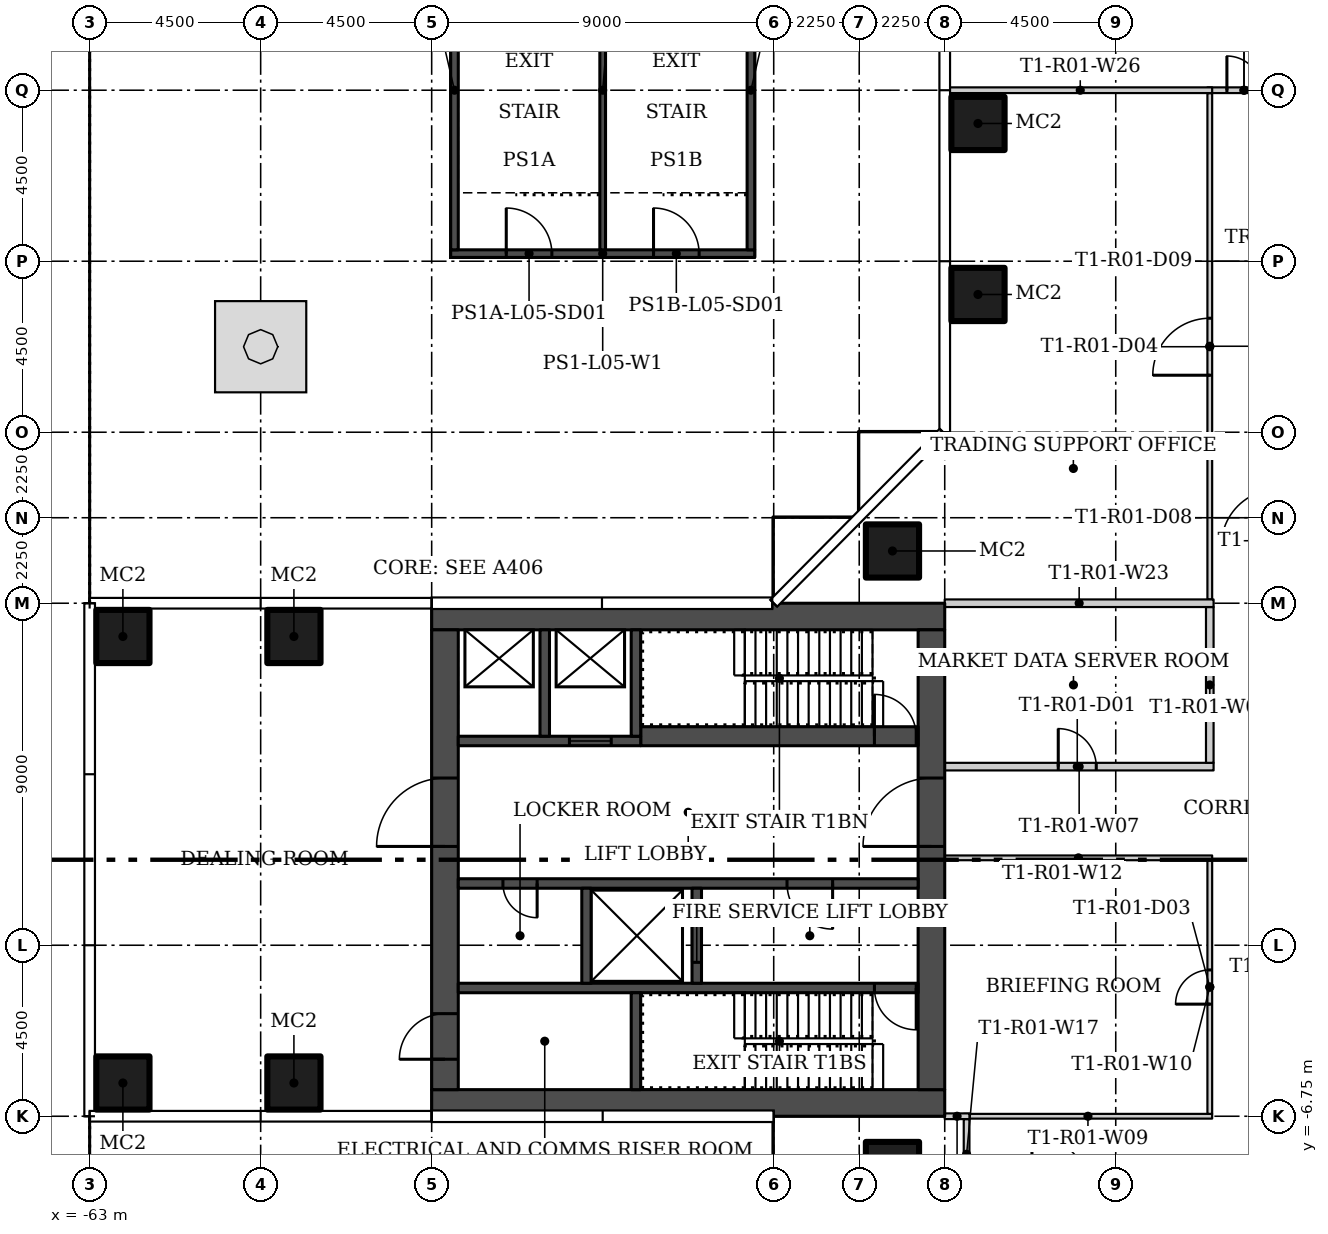
"""IFC4 building model, lengths in metres.
Left out: names, types, materials, properties, quantities, classifications, styles, units other than length and angle.
Written with IfcOpenShell. Run it as: python <this file> out.ifc"""

import sys

from ifc_helpers import new_model, si_unit, direction, frame, frame_2d, origin, origin_2d, place, context, subcontext, project, spatial, rectangle, hollow_rectangle, extrude, element, fill, save


model = new_model("IFC4")
c1 = context("Model", 3, precision=1e-05, world=origin(), true_north=direction((0.0, 1.0)))
c2 = subcontext(c1, "Body", "Model", "MODEL_VIEW")
j1 = project(units=[si_unit("LENGTHUNIT", "METRE"), si_unit("PLANEANGLEUNIT", "RADIAN")], contexts=[c1])
p1 = place(None, origin())
s1 = spatial("IfcSite", under=j1, at=p1, CompositionType="ELEMENT")
p2 = place(p1, origin())
s2 = spatial("IfcBuilding", under=s1, at=p2, CompositionType="ELEMENT")
p3 = place(p2, frame((0.0, 0.0, 28.5)))
s3 = spatial("IfcBuildingStorey", under=s2, at=p3, CompositionType="ELEMENT", Elevation=28.5)
for number, where in (
    (1, (-41.875, 8.125, 0.0)),
    (2, (-41.875, -8.125, 0.0)),
    (3, (-57.625, -5.875, 0.0)),
    (4, (-62.125, -5.875, 0.0)),
    (5, (-57.625, 5.875, 0.0)),
    (6, (-62.125, 5.875, 0.0)),
    (7, (-39.625, 14.875, 0.0)),
    (8, (-39.625, 19.375, 0.0)),
):
    element("IfcColumn", number, at=place(p3, frame(where)), inside=s3, PredefinedType="COLUMN", context=c2, shape_type="SweptSolid", body=[
        extrude(hollow_rectangle(XDim=1.4, YDim=1.4, WallThickness=0.05, at=origin_2d()), origin(), (0.0, 0.0, 1.0), 4.15),
    ])
p4 = place(p3, frame((-40.5, 2.45, 0.0)))
e9 = element("IfcWall", 9, at=p4, inside=s3, PredefinedType="PARTITIONING", context=c2, shape_type="SweptSolid", body=[
    extrude(rectangle(XDim=7.075, YDim=0.2, at=frame_2d((3.537, 0.0))), origin(), (0.0, 0.0, 1.0), 4.15),
])
p5 = place(p4, frame((2.987, 0.0, 0.0)))
e10 = element("IfcOpeningElement", 10, at=p5, cuts=e9, PredefinedType="OPENING", context=c2, shape_type="SweptSolid", body=[
    extrude(rectangle(XDim=1.0, YDim=2.1, at=frame_2d((0.5, 1.05))), frame((0.0, 0.11, 0.0), z_axis=(0.0, -1.0, 0.0), x_axis=(1.0, 0.0, 0.0)), (0.0, 0.0, 1.0), 0.22),
])
p6 = place(p3, frame((-33.525, 2.55, 0.0), z_axis=(0.0, 0.0, 1.0), x_axis=(0.0, 1.0, 0.0)))
e11 = element("IfcWall", 11, at=p6, inside=s3, PredefinedType="PARTITIONING", context=c2, shape_type="SweptSolid", body=[
    extrude(rectangle(XDim=4.1, YDim=0.2, at=frame_2d((2.05, 0.0))), origin(), (0.0, 0.0, 1.0), 4.15),
])
p7 = place(p3, frame((-40.0, -6.75, 0.0)))
e12 = element("IfcWall", 12, at=p7, inside=s3, PredefinedType="PARTITIONING", context=c2, shape_type="SweptSolid", body=[
    extrude(rectangle(XDim=6.537, YDim=0.125, at=frame_2d((3.269, 0.0))), origin(), (0.0, 0.0, 1.0), 4.15),
])
p8 = place(p3, frame((-33.525, -6.688, 0.0), z_axis=(0.0, 0.0, 1.0), x_axis=(0.0, 1.0, 0.0)))
e13 = element("IfcWall", 13, at=p8, inside=s3, PredefinedType="PARTITIONING", context=c2, shape_type="SweptSolid", body=[
    extrude(rectangle(XDim=6.675, YDim=0.125, at=frame_2d((3.337, 0.0))), origin(), (0.0, 0.0, 1.0), 4.15),
])
p9 = place(p8, frame((2.887, 0.0, 0.0)))
e14 = element("IfcOpeningElement", 14, at=p9, cuts=e13, PredefinedType="OPENING", context=c2, shape_type="SweptSolid", body=[
    extrude(rectangle(XDim=0.9, YDim=2.1, at=frame_2d((0.45, 1.05))), frame((0.0, 0.073, 0.0), z_axis=(0.0, -1.0, 0.0), x_axis=(1.0, 0.0, 0.0)), (0.0, 0.0, 1.0), 0.145),
])
p10 = place(p3, frame((-33.525, 6.85, 0.0), z_axis=(0.0, 0.0, 1.0), x_axis=(0.0, 1.0, 0.0)))
e15 = element("IfcWall", 15, at=p10, inside=s3, PredefinedType="PARTITIONING", context=c2, shape_type="SweptSolid", body=[
    extrude(rectangle(XDim=13.325, YDim=0.125, at=frame_2d((6.663, 0.0))), origin(), (0.0, 0.0, 1.0), 4.15),
])
p11 = place(p10, frame((5.9, 0.0, 0.0)))
e16 = element("IfcOpeningElement", 16, at=p11, cuts=e15, PredefinedType="OPENING", context=c2, shape_type="SweptSolid", body=[
    extrude(rectangle(XDim=1.5, YDim=2.1, at=frame_2d((0.75, 1.05))), frame((0.0, 0.073, 0.0), z_axis=(0.0, -1.0, 0.0), x_axis=(1.0, 0.0, 0.0)), (0.0, 0.0, 1.0), 0.145),
])
p12 = place(p3, frame((-33.463, 0.05, 0.0), z_axis=(0.0, 0.0, 1.0), x_axis=(-1.0, 0.0, 0.0)))
e17 = element("IfcWall", 17, at=p12, inside=s3, PredefinedType="PARTITIONING", context=c2, shape_type="SweptSolid", body=[
    extrude(rectangle(XDim=7.037, YDim=0.125, at=frame_2d((3.519, 0.0))), origin(), (0.0, 0.0, 1.0), 4.15),
])
p13 = place(p3, frame((-33.588, 20.25, 0.0)))
e18 = element("IfcWall", 18, at=p13, inside=s3, PredefinedType="PARTITIONING", context=c2, shape_type="SweptSolid", body=[
    extrude(rectangle(XDim=1.926, YDim=0.15, at=frame_2d((0.963, 0.0))), origin(), (0.0, 0.0, 1.0), 4.15),
])
p14 = place(p13, frame((0.513, 0.0, 0.0)))
e19 = element("IfcOpeningElement", 19, at=p14, cuts=e18, PredefinedType="OPENING", context=c2, shape_type="SweptSolid", body=[
    extrude(rectangle(XDim=0.9, YDim=2.1, at=frame_2d((0.45, 1.05))), frame((0.0, 0.085, 0.0), z_axis=(0.0, -1.0, 0.0), x_axis=(1.0, 0.0, 0.0)), (0.0, 0.0, 1.0), 0.17),
])
p15 = place(p3, frame((-39.925, -6.825, 0.0), z_axis=(0.0, 0.0, 1.0), x_axis=(0.0, -1.0, 0.0)))
e20 = element("IfcWall", 20, at=p15, inside=s3, PredefinedType="PARTITIONING", context=c2, shape_type="SweptSolid", body=[
    extrude(rectangle(XDim=1.85, YDim=0.15, at=frame_2d((0.925, 0.0))), origin(), (0.0, 0.0, 1.0), 4.15),
])
p16 = place(p3, frame((-40.5, -6.75, 0.0)))
e21 = element("IfcWall", 21, at=p16, inside=s3, PredefinedType="PARTITIONING", context=c2, shape_type="SweptSolid", body=[
    extrude(rectangle(XDim=0.65, YDim=0.15, at=frame_2d((0.325, 0.0))), origin(), (0.0, 0.0, 1.0), 4.15),
])
p17 = place(p3, frame((-33.425, 6.75, 0.0), z_axis=(0.0, 0.0, 1.0), x_axis=(-1.0, 0.0, 0.0)))
e22 = element("IfcWall", 22, at=p17, inside=s3, PredefinedType="PARTITIONING", context=c2, shape_type="SweptSolid", body=[
    extrude(rectangle(XDim=7.075, YDim=0.2, at=frame_2d((3.537, 0.0))), origin(), (0.0, 0.0, 1.0), 4.15),
])
p18 = place(p3, frame((-33.463, 20.25, 0.0), z_axis=(0.0, 0.0, 1.0), x_axis=(-1.0, 0.0, 0.0)))
e23 = element("IfcWall", 23, at=p18, inside=s3, PredefinedType="PARTITIONING", context=c2, shape_type="SweptSolid", body=[
    extrude(rectangle(XDim=6.942, YDim=0.15, at=frame_2d((3.471, 0.0))), origin(), (0.0, 0.0, 1.0), 4.15),
])
for number, where, z_axis, x_axis in (
    (24, (-40.5, -6.4, 0.0), (0.0, 0.0, 1.0), (-1.0, 0.0, 0.0)),
    (25, (-40.5, 6.4, 0.0), (0.0, 0.0, 1.0), (-1.0, 0.0, 0.0)),
):
    element("IfcWall", number, at=place(p3, frame(where, z_axis=z_axis, x_axis=x_axis)), inside=s3, PredefinedType="SHEAR", context=c2, shape_type="SweptSolid", body=[
        extrude(rectangle(XDim=13.5, YDim=0.7, at=frame_2d((6.75, 0.0))), origin(), (0.0, 0.0, 1.0), 4.15),
    ])
p19 = place(p3, frame((-40.85, -6.05, 0.0), z_axis=(0.0, 0.0, 1.0), x_axis=(0.0, 1.0, 0.0)))
e26 = element("IfcWall", 26, at=p19, inside=s3, PredefinedType="SHEAR", context=c2, shape_type="SweptSolid", body=[
    extrude(rectangle(XDim=12.1, YDim=0.7, at=frame_2d((6.05, 0.0))), origin(), (0.0, 0.0, 1.0), 4.15),
])
p20 = place(p19, frame((6.4, 0.0, 0.0)))
e27 = element("IfcOpeningElement", 27, at=p20, cuts=e26, PredefinedType="OPENING", context=c2, shape_type="SweptSolid", body=[
    extrude(rectangle(XDim=1.8, YDim=2.4, at=frame_2d((0.9, 1.2))), frame((0.0, 0.36, 0.0), z_axis=(0.0, -1.0, 0.0), x_axis=(1.0, 0.0, 0.0)), (0.0, 0.0, 1.0), 0.72),
])
p21 = place(p3, frame((-53.65, -6.05, 0.0), z_axis=(0.0, 0.0, 1.0), x_axis=(0.0, 1.0, 0.0)))
e28 = element("IfcWall", 28, at=p21, inside=s3, PredefinedType="SHEAR", context=c2, shape_type="SweptSolid", body=[
    extrude(rectangle(XDim=12.1, YDim=0.7, at=frame_2d((6.05, 0.0))), origin(), (0.0, 0.0, 1.0), 4.15),
])
p22 = place(p21, frame((0.8, 0.0, 0.0)))
e29 = element("IfcOpeningElement", 29, at=p22, cuts=e28, PredefinedType="OPENING", context=c2, shape_type="SweptSolid", body=[
    extrude(rectangle(XDim=1.2, YDim=2.1, at=frame_2d((0.6, 1.05))), frame((0.0, 0.36, 0.0), z_axis=(0.0, -1.0, 0.0), x_axis=(1.0, 0.0, 0.0)), (0.0, 0.0, 1.0), 0.72),
])
p23 = place(p21, frame((6.4, 0.0, 0.0)))
e30 = element("IfcOpeningElement", 30, at=p23, cuts=e28, PredefinedType="OPENING", context=c2, shape_type="SweptSolid", body=[
    extrude(rectangle(XDim=1.8, YDim=2.4, at=frame_2d((0.9, 1.2))), frame((0.0, 0.36, 0.0), z_axis=(0.0, -1.0, 0.0), x_axis=(1.0, 0.0, 0.0)), (0.0, 0.0, 1.0), 0.72),
])
p24 = place(p3, frame((-41.2, -3.375, 0.0), z_axis=(0.0, 0.0, 1.0), x_axis=(-1.0, 0.0, 0.0)))
e31 = element("IfcWall", 31, at=p24, inside=s3, PredefinedType="SHEAR", context=c2, shape_type="SweptSolid", body=[
    extrude(rectangle(XDim=12.1, YDim=0.25, at=frame_2d((6.05, 0.0))), origin(), (0.0, 0.0, 1.0), 4.15),
])
p25 = place(p24, frame((0.05, 0.0, 0.0)))
e32 = element("IfcOpeningElement", 32, at=p25, cuts=e31, PredefinedType="OPENING", context=c2, shape_type="SweptSolid", body=[
    extrude(rectangle(XDim=1.1, YDim=2.1, at=frame_2d((0.55, 1.05))), frame((0.0, 0.135, 0.0), z_axis=(0.0, -1.0, 0.0), x_axis=(1.0, 0.0, 0.0)), (0.0, 0.0, 1.0), 0.27),
])
p26 = place(p3, frame((-48.625, -6.05, 0.0), z_axis=(0.0, 0.0, 1.0), x_axis=(0.0, 1.0, 0.0)))
e33 = element("IfcWall", 33, at=p26, inside=s3, PredefinedType="SHEAR", context=c2, shape_type="SweptSolid", body=[
    extrude(rectangle(XDim=2.55, YDim=0.25, at=frame_2d((1.275, 0.0))), origin(), (0.0, 0.0, 1.0), 4.15),
])
p27 = place(p3, frame((-41.2, -0.625, 0.0), z_axis=(0.0, 0.0, 1.0), x_axis=(-1.0, 0.0, 0.0)))
e34 = element("IfcWall", 34, at=p27, inside=s3, PredefinedType="SHEAR", context=c2, shape_type="SweptSolid", body=[
    extrude(rectangle(XDim=12.1, YDim=0.25, at=frame_2d((6.05, 0.0))), origin(), (0.0, 0.0, 1.0), 4.15),
])
p28 = place(p27, frame((2.25, 0.0, 0.0)))
e35 = element("IfcOpeningElement", 35, at=p28, cuts=e34, PredefinedType="OPENING", context=c2, shape_type="SweptSolid", body=[
    extrude(rectangle(XDim=1.2, YDim=2.1, at=frame_2d((0.6, 1.05))), frame((0.0, 0.135, 0.0), z_axis=(0.0, -1.0, 0.0), x_axis=(1.0, 0.0, 0.0)), (0.0, 0.0, 1.0), 0.27),
])
p29 = place(p27, frame((10.025, 0.0, 0.0)))
e36 = element("IfcOpeningElement", 36, at=p29, cuts=e34, PredefinedType="OPENING", context=c2, shape_type="SweptSolid", body=[
    extrude(rectangle(XDim=0.9, YDim=2.1, at=frame_2d((0.45, 1.05))), frame((0.0, 0.135, 0.0), z_axis=(0.0, -1.0, 0.0), x_axis=(1.0, 0.0, 0.0)), (0.0, 0.0, 1.0), 0.27),
])
p30 = place(p3, frame((-47.025, -3.25, 0.0), z_axis=(0.0, 0.0, 1.0), x_axis=(0.0, 1.0, 0.0)))
e37 = element("IfcWall", 37, at=p30, inside=s3, PredefinedType="SHEAR", context=c2, shape_type="SweptSolid", body=[
    extrude(rectangle(XDim=2.5, YDim=0.25, at=frame_2d((1.25, 0.0))), origin(), (0.0, 0.0, 1.0), 4.15),
])
p31 = place(p30, frame((0.55, 0.0, 0.0)))
e38 = element("IfcOpeningElement", 38, at=p31, cuts=e37, PredefinedType="OPENING", context=c2, shape_type="SweptSolid", body=[
    extrude(rectangle(XDim=1.4, YDim=2.4, at=frame_2d((0.7, 1.2))), frame((0.0, 0.135, 0.0), z_axis=(0.0, -1.0, 0.0), x_axis=(1.0, 0.0, 0.0)), (0.0, 0.0, 1.0), 0.27),
])
p32 = place(p3, frame((-49.925, -3.25, 0.0), z_axis=(0.0, 0.0, 1.0), x_axis=(0.0, 1.0, 0.0)))
e39 = element("IfcWall", 39, at=p32, inside=s3, PredefinedType="SHEAR", context=c2, shape_type="SweptSolid", body=[
    extrude(rectangle(XDim=2.5, YDim=0.25, at=frame_2d((1.25, 0.0))), origin(), (0.0, 0.0, 1.0), 4.15),
])
p33 = place(p3, frame((-48.5, 3.25, 0.0)))
e40 = element("IfcWall", 40, at=p33, inside=s3, PredefinedType="SHEAR", context=c2, shape_type="SweptSolid", body=[
    extrude(rectangle(XDim=7.3, YDim=0.5, at=frame_2d((3.65, 0.0))), origin(), (0.0, 0.0, 1.0), 4.15),
])
p34 = place(p33, frame((6.15, 0.0, 0.0)))
e41 = element("IfcOpeningElement", 41, at=p34, cuts=e40, PredefinedType="OPENING", context=c2, shape_type="SweptSolid", body=[
    extrude(rectangle(XDim=1.1, YDim=2.1, at=frame_2d((0.55, 1.05))), frame((0.0, 0.26, 0.0), z_axis=(0.0, -1.0, 0.0), x_axis=(1.0, 0.0, 0.0)), (0.0, 0.0, 1.0), 0.52),
])
p35 = place(p3, frame((-48.5, 3.125, 0.0), z_axis=(0.0, 0.0, 1.0), x_axis=(-1.0, 0.0, 0.0)))
e42 = element("IfcWall", 42, at=p35, inside=s3, PredefinedType="SHEAR", context=c2, shape_type="SweptSolid", body=[
    extrude(rectangle(XDim=4.8, YDim=0.25, at=frame_2d((2.4, 0.0))), origin(), (0.0, 0.0, 1.0), 4.15),
])
p36 = place(p35, frame((0.775, 0.0, 0.0)))
e43 = element("IfcOpeningElement", 43, at=p36, cuts=e42, PredefinedType="OPENING", context=c2, shape_type="SweptSolid", body=[
    extrude(rectangle(XDim=1.1, YDim=2.1, at=frame_2d((0.55, 1.05))), frame((0.0, 0.135, 0.0), z_axis=(0.0, -1.0, 0.0), x_axis=(1.0, 0.0, 0.0)), (0.0, 0.0, 1.0), 0.27),
])
for number, where, z_axis, x_axis in (
    (44, (-48.625, 3.25, 0.0), (0.0, 0.0, 1.0), (0.0, 1.0, 0.0)),
    (45, (-51.025, 3.25, 0.0), (0.0, 0.0, 1.0), (0.0, 1.0, 0.0)),
):
    element("IfcWall", number, at=place(p3, frame(where, z_axis=z_axis, x_axis=x_axis)), inside=s3, PredefinedType="SHEAR", context=c2, shape_type="SweptSolid", body=[
        extrude(rectangle(XDim=2.8, YDim=0.25, at=frame_2d((1.4, 0.0))), origin(), (0.0, 0.0, 1.0), 4.15),
    ])
p37 = place(p3, frame((-53.5, 15.95, 0.0)))
e46 = element("IfcWall", 46, at=p37, inside=s3, PredefinedType="SHEAR", context=c2, shape_type="SweptSolid", body=[
    extrude(rectangle(XDim=8.0, YDim=0.2, at=frame_2d((4.0, 0.0))), origin(), (0.0, 0.0, 1.0), 2.8),
])
p38 = place(p37, frame((1.462, 0.0, 0.0)))
e47 = element("IfcOpeningElement", 47, at=p38, cuts=e46, PredefinedType="OPENING", context=c2, shape_type="SweptSolid", body=[
    extrude(rectangle(XDim=1.2, YDim=2.4, at=frame_2d((0.6, 1.2))), frame((0.0, 0.11, 0.0), z_axis=(0.0, -1.0, 0.0), x_axis=(1.0, 0.0, 0.0)), (0.0, 0.0, 1.0), 0.22),
])
p39 = place(p37, frame((5.337, 0.0, 0.0)))
e48 = element("IfcOpeningElement", 48, at=p39, cuts=e46, PredefinedType="OPENING", context=c2, shape_type="SweptSolid", body=[
    extrude(rectangle(XDim=1.2, YDim=2.4, at=frame_2d((0.6, 1.2))), frame((0.0, 0.11, 0.0), z_axis=(0.0, -1.0, 0.0), x_axis=(1.0, 0.0, 0.0)), (0.0, 0.0, 1.0), 0.22),
])
for number, where, z_axis, x_axis in (
    (49, (-53.4, 16.05, 0.0), (0.0, 0.0, 1.0), (0.0, 1.0, 0.0)),
    (50, (-45.6, 16.05, 0.0), (0.0, 0.0, 1.0), (0.0, 1.0, 0.0)),
):
    element("IfcWall", number, at=place(p3, frame(where, z_axis=z_axis, x_axis=x_axis)), inside=s3, PredefinedType="SHEAR", context=c2, shape_type="SweptSolid", body=[
        extrude(rectangle(XDim=8.4, YDim=0.2, at=frame_2d((4.2, 0.0))), origin(), (0.0, 0.0, 1.0), 2.8),
    ])
p40 = place(p3, frame((-49.5, 16.05, 0.0), z_axis=(0.0, 0.0, 1.0), x_axis=(0.0, 1.0, 0.0)))
e51 = element("IfcWall", 51, at=p40, inside=s3, PredefinedType="SHEAR", context=c2, shape_type="SweptSolid", body=[
    extrude(rectangle(XDim=8.4, YDim=0.15, at=frame_2d((4.2, 0.0))), origin(), (0.0, 0.0, 1.0), 2.8),
])
p41 = place(p5, origin())
e52 = element("IfcDoor", 52, at=p41, inside=s3, OperationType="SINGLE_SWING_LEFT", PredefinedType="DOOR", context=c2, shape_type="SweptSolid", body=[
    extrude(rectangle(XDim=1.0, YDim=2.1, at=frame_2d((0.5, 1.05))), frame((0.0, 0.025, 0.0), z_axis=(0.0, -1.0, 0.0), x_axis=(1.0, 0.0, 0.0)), (0.0, 0.0, 1.0), 0.05),
])
fill(e10, e52)
p42 = place(p9, origin())
e53 = element("IfcDoor", 53, at=p42, inside=s3, OperationType="SINGLE_SWING_RIGHT", PredefinedType="DOOR", context=c2, shape_type="SweptSolid", body=[
    extrude(rectangle(XDim=0.9, YDim=2.1, at=frame_2d((0.45, 1.05))), frame((0.0, 0.025, 0.0), z_axis=(0.0, -1.0, 0.0), x_axis=(1.0, 0.0, 0.0)), (0.0, 0.0, 1.0), 0.05),
])
fill(e14, e53)
p43 = place(p11, origin())
e54 = element("IfcDoor", 54, at=p43, inside=s3, OperationType="DOUBLE_DOOR_SINGLE_SWING", PredefinedType="DOOR", context=c2, shape_type="SweptSolid", body=[
    extrude(rectangle(XDim=1.5, YDim=2.1, at=frame_2d((0.75, 1.05))), frame((0.0, 0.025, 0.0), z_axis=(0.0, -1.0, 0.0), x_axis=(1.0, 0.0, 0.0)), (0.0, 0.0, 1.0), 0.05),
])
fill(e16, e54)
p44 = place(p14, origin())
e55 = element("IfcDoor", 55, at=p44, inside=s3, OperationType="SINGLE_SWING_LEFT", PredefinedType="DOOR", context=c2, shape_type="SweptSolid", body=[
    extrude(rectangle(XDim=0.9, YDim=2.1, at=frame_2d((0.45, 1.05))), frame((0.0, 0.025, 0.0), z_axis=(0.0, -1.0, 0.0), x_axis=(1.0, 0.0, 0.0)), (0.0, 0.0, 1.0), 0.05),
])
fill(e19, e55)
p45 = place(p20, origin())
e56 = element("IfcDoor", 56, at=p45, inside=s3, OperationType="DOUBLE_DOOR_SINGLE_SWING", PredefinedType="DOOR", context=c2, shape_type="SweptSolid", body=[
    extrude(rectangle(XDim=1.8, YDim=2.4, at=frame_2d((0.9, 1.2))), frame((0.0, 0.025, 0.0), z_axis=(0.0, -1.0, 0.0), x_axis=(1.0, 0.0, 0.0)), (0.0, 0.0, 1.0), 0.05),
])
fill(e27, e56)
p46 = place(p22, origin())
e57 = element("IfcDoor", 57, at=p46, inside=s3, OperationType="SINGLE_SWING_LEFT", PredefinedType="DOOR", context=c2, shape_type="SweptSolid", body=[
    extrude(rectangle(XDim=1.2, YDim=2.1, at=frame_2d((0.6, 1.05))), frame((0.0, 0.025, 0.0), z_axis=(0.0, -1.0, 0.0), x_axis=(1.0, 0.0, 0.0)), (0.0, 0.0, 1.0), 0.05),
])
fill(e29, e57)
p47 = place(p23, origin())
e58 = element("IfcDoor", 58, at=p47, inside=s3, OperationType="DOUBLE_DOOR_SINGLE_SWING", PredefinedType="DOOR", context=c2, shape_type="SweptSolid", body=[
    extrude(rectangle(XDim=1.8, YDim=2.4, at=frame_2d((0.9, 1.2))), frame((0.0, 0.025, 0.0), z_axis=(0.0, -1.0, 0.0), x_axis=(1.0, 0.0, 0.0)), (0.0, 0.0, 1.0), 0.05),
])
fill(e30, e58)
p48 = place(p25, origin())
e59 = element("IfcDoor", 59, at=p48, inside=s3, OperationType="SINGLE_SWING_LEFT", PredefinedType="DOOR", context=c2, shape_type="SweptSolid", body=[
    extrude(rectangle(XDim=1.1, YDim=2.1, at=frame_2d((0.55, 1.05))), frame((0.0, 0.025, 0.0), z_axis=(0.0, -1.0, 0.0), x_axis=(1.0, 0.0, 0.0)), (0.0, 0.0, 1.0), 0.05),
])
fill(e32, e59)
p49 = place(p28, origin())
e60 = element("IfcDoor", 60, at=p49, inside=s3, OperationType="SINGLE_SWING_LEFT", PredefinedType="DOOR", context=c2, shape_type="SweptSolid", body=[
    extrude(rectangle(XDim=1.2, YDim=2.1, at=frame_2d((0.6, 1.05))), frame((0.0, 0.025, 0.0), z_axis=(0.0, -1.0, 0.0), x_axis=(1.0, 0.0, 0.0)), (0.0, 0.0, 1.0), 0.05),
])
fill(e35, e60)
p50 = place(p29, origin())
e61 = element("IfcDoor", 61, at=p50, inside=s3, OperationType="SINGLE_SWING_RIGHT", PredefinedType="DOOR", context=c2, shape_type="SweptSolid", body=[
    extrude(rectangle(XDim=0.9, YDim=2.1, at=frame_2d((0.45, 1.05))), frame((0.0, 0.025, 0.0), z_axis=(0.0, -1.0, 0.0), x_axis=(1.0, 0.0, 0.0)), (0.0, 0.0, 1.0), 0.05),
])
fill(e36, e61)
p51 = place(p31, origin())
e62 = element("IfcDoor", 62, at=p51, inside=s3, OperationType="SLIDING_TO_LEFT", PredefinedType="DOOR", context=c2, shape_type="SweptSolid", body=[
    extrude(rectangle(XDim=1.4, YDim=2.4, at=frame_2d((0.7, 1.2))), frame((0.0, 0.025, 0.0), z_axis=(0.0, -1.0, 0.0), x_axis=(1.0, 0.0, 0.0)), (0.0, 0.0, 1.0), 0.05),
])
fill(e38, e62)
p52 = place(p34, origin())
e63 = element("IfcDoor", 63, at=p52, inside=s3, OperationType="SINGLE_SWING_RIGHT", PredefinedType="DOOR", context=c2, shape_type="SweptSolid", body=[
    extrude(rectangle(XDim=1.1, YDim=2.1, at=frame_2d((0.55, 1.05))), frame((0.0, 0.025, 0.0), z_axis=(0.0, -1.0, 0.0), x_axis=(1.0, 0.0, 0.0)), (0.0, 0.0, 1.0), 0.05),
])
fill(e41, e63)
p53 = place(p36, origin())
e64 = element("IfcDoor", 64, at=p53, inside=s3, OperationType="SLIDING_TO_LEFT", PredefinedType="DOOR", context=c2, shape_type="SweptSolid", body=[
    extrude(rectangle(XDim=1.1, YDim=2.1, at=frame_2d((0.55, 1.05))), frame((0.0, 0.025, 0.0), z_axis=(0.0, -1.0, 0.0), x_axis=(1.0, 0.0, 0.0)), (0.0, 0.0, 1.0), 0.05),
])
fill(e43, e64)
p54 = place(p38, origin())
e65 = element("IfcDoor", 65, at=p54, inside=s3, OperationType="SINGLE_SWING_LEFT", PredefinedType="DOOR", context=c2, shape_type="SweptSolid", body=[
    extrude(rectangle(XDim=1.2, YDim=2.4, at=frame_2d((0.6, 1.2))), frame((0.0, 0.025, 0.0), z_axis=(0.0, -1.0, 0.0), x_axis=(1.0, 0.0, 0.0)), (0.0, 0.0, 1.0), 0.05),
])
fill(e47, e65)
p55 = place(p39, origin())
e66 = element("IfcDoor", 66, at=p55, inside=s3, OperationType="SINGLE_SWING_RIGHT", PredefinedType="DOOR", context=c2, shape_type="SweptSolid", body=[
    extrude(rectangle(XDim=1.2, YDim=2.4, at=frame_2d((0.6, 1.2))), frame((0.0, 0.025, 0.0), z_axis=(0.0, -1.0, 0.0), x_axis=(1.0, 0.0, 0.0)), (0.0, 0.0, 1.0), 0.05),
])
fill(e48, e66)
save(model, sys.argv[1])
